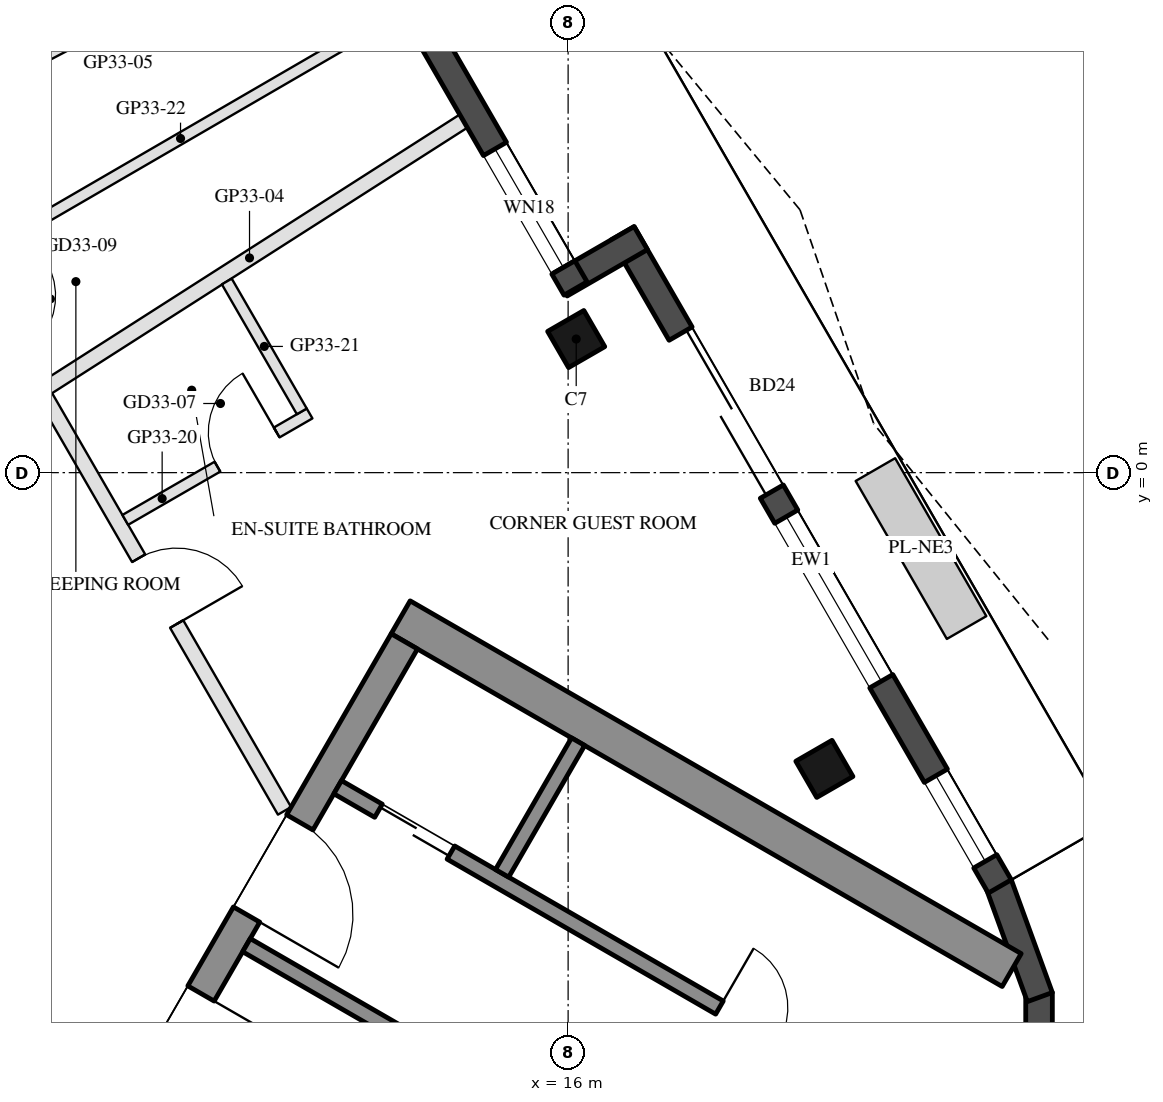
"""IFC4 building model, lengths in metres.
Left out: names, types, materials, properties, quantities, classifications, styles, units other than length and angle.
Written with IfcOpenShell. Run it as: python <this file> out.ifc"""

import sys

from ifc_helpers import new_model, si_unit, direction, frame, frame_2d, origin, origin_2d, place, context, subcontext, project, spatial, rectangle, hollow_rectangle, extrude, boolean, halfspace, element, fill, save


model = new_model("IFC4")
c1 = context("Model", 3, precision=1e-05, world=origin(), true_north=direction((0.0, 1.0)))
c2 = subcontext(c1, "Body", "Model", "MODEL_VIEW")
j1 = project(units=[si_unit("LENGTHUNIT", "METRE"), si_unit("PLANEANGLEUNIT", "RADIAN")], contexts=[c1])
p1 = place(None, origin())
s1 = spatial("IfcSite", under=j1, at=p1, CompositionType="ELEMENT")
p2 = place(p1, origin())
s2 = spatial("IfcBuilding", under=s1, at=p2, CompositionType="ELEMENT")
p3 = place(p2, frame((0.0, 0.0, 317.0)))
s3 = spatial("IfcBuildingStorey", under=s2, at=p3, CompositionType="ELEMENT", Elevation=317.0)
p4 = place(p3, frame((19.372, -3.898, 0.0), z_axis=(0.0, 0.0, 1.0), x_axis=(-0.5, 0.866025403784, 0.0)))
e1 = element("IfcColumn", 1, at=p4, inside=s3, PredefinedType="COLUMN", context=c2, shape_type="SweptSolid", body=[
    boolean("DIFFERENCE", extrude(hollow_rectangle(XDim=0.55, YDim=0.55, WallThickness=0.025, at=origin_2d()), origin(), (0.0, 0.0, 1.0), 3.7), halfspace(frame((0.0, 0.0, 3.66), z_axis=(0.0, 0.0, 1.0), x_axis=(1.0, 0.0, 0.0)), False)),
])
p5 = place(p3, frame((16.106, 1.758, 0.0), z_axis=(0.0, 0.0, 1.0), x_axis=(-0.5, 0.866025403784, 0.0)))
e2 = element("IfcColumn", 2, at=p5, inside=s3, PredefinedType="COLUMN", context=c2, shape_type="SweptSolid", body=[
    boolean("DIFFERENCE", extrude(hollow_rectangle(XDim=0.55, YDim=0.55, WallThickness=0.025, at=origin_2d()), origin(), (0.0, 0.0, 1.0), 3.7), halfspace(frame((0.0, 0.0, 3.666), z_axis=(0.0, 0.0, 1.0), x_axis=(1.0, 0.0, 0.0)), False)),
])
for number, where, z_axis, x_axis in (
    (3, (22.196, -8.42, 0.0), (0.0, 0.0, 1.0), (0.0, 1.0, 0.0)),
    (4, (22.206, -6.9, 0.0), (0.0, 0.0, 1.0), (-0.342, 0.94, 0.0)),
):
    element("IfcWall", number, at=place(p3, frame(where, z_axis=z_axis, x_axis=x_axis)), inside=s3, PredefinedType="SOLIDWALL", context=c2, shape_type="SweptSolid", body=[
        extrude(rectangle(XDim=1.579, YDim=0.35, at=frame_2d((0.79, 0.0))), origin(), (0.0, 0.0, 1.0), 3.55),
    ])
p6 = place(p3, frame((21.679, -5.444, 0.0), z_axis=(0.0, 0.0, 1.0), x_axis=(-0.500020587865, 0.866013517049, 0.0)))
e5 = element("IfcWall", 5, at=p6, inside=s3, PredefinedType="SOLIDWALL", context=c2, shape_type="SweptSolid", body=[
    extrude(rectangle(XDim=9.924, YDim=0.35, at=frame_2d((4.962, 0.0))), origin(), (0.0, 0.0, 1.0), 3.55),
])
p7 = place(p6, frame((0.381, 0.0, 0.3)))
e6 = element("IfcOpeningElement", 6, at=p7, cuts=e5, PredefinedType="OPENING", context=c2, shape_type="SweptSolid", body=[
    extrude(rectangle(XDim=1.3, YDim=2.65, at=frame_2d((0.65, 1.325))), frame((0.0, 0.185, 0.0), z_axis=(0.0, -1.0, 0.0), x_axis=(1.0, 0.0, 0.0)), (0.0, 0.0, 1.0), 0.37),
])
p8 = place(p6, frame((5.999, 0.0, 0.0)))
e7 = element("IfcOpeningElement", 7, at=p8, cuts=e5, PredefinedType="OPENING", context=c2, shape_type="SweptSolid", body=[
    extrude(rectangle(XDim=2.4, YDim=2.4, at=frame_2d((1.2, 1.2))), frame((0.0, 0.185, 0.0), z_axis=(0.0, -1.0, 0.0), x_axis=(1.0, 0.0, 0.0)), (0.0, 0.0, 1.0), 0.37),
])
p9 = place(p6, frame((3.118, 0.0, 0.3)))
e8 = element("IfcOpeningElement", 8, at=p9, cuts=e5, PredefinedType="OPENING", context=c2, shape_type="SweptSolid", body=[
    extrude(rectangle(XDim=2.5, YDim=2.65, at=frame_2d((1.25, 1.325))), frame((0.0, 0.185, 0.0), z_axis=(0.0, -1.0, 0.0), x_axis=(1.0, 0.0, 0.0)), (0.0, 0.0, 1.0), 0.37),
])
p10 = place(p3, frame((16.956, 3.086, 0.0), z_axis=(0.0, 0.0, 1.0), x_axis=(-0.866005645448, -0.500034220881, 0.0)))
e9 = element("IfcWall", 9, at=p10, inside=s3, PredefinedType="SOLIDWALL", context=c2, shape_type="SweptSolid", body=[
    extrude(rectangle(XDim=1.22, YDim=0.35, at=frame_2d((0.61, 0.0))), origin(), (0.0, 0.0, 1.0), 3.55),
])
p11 = place(p3, frame((16.098, 2.423, 0.0), z_axis=(0.0, 0.0, 1.0), x_axis=(-0.499996591357, 0.866027371756, 0.0)))
e10 = element("IfcWall", 10, at=p11, inside=s3, PredefinedType="SOLIDWALL", context=c2, shape_type="SweptSolid", body=[
    extrude(rectangle(XDim=5.371, YDim=0.35, at=frame_2d((2.685, 0.0))), origin(), (0.0, 0.0, 1.0), 3.55),
])
p12 = place(p11, frame((0.32, 0.0, 0.3)))
e11 = element("IfcOpeningElement", 11, at=p12, cuts=e10, PredefinedType="OPENING", context=c2, shape_type="SweptSolid", body=[
    extrude(rectangle(XDim=1.8, YDim=2.65, at=frame_2d((0.9, 1.325))), frame((0.0, 0.185, 0.0), z_axis=(0.0, -1.0, 0.0), x_axis=(1.0, 0.0, 0.0)), (0.0, 0.0, 1.0), 0.37),
])
p13 = place(p3, frame((13.797, -1.903, 0.0), z_axis=(0.0, 0.0, 1.0), x_axis=(0.866025286072, -0.500000203884, 0.0)))
e12 = element("IfcWall", 12, at=p13, inside=s3, PredefinedType="SHEAR", context=c2, shape_type="SweptSolid", body=[
    extrude(rectangle(XDim=9.283, YDim=0.5, at=frame_2d((4.641, 0.0))), origin(), (0.0, 0.0, 1.0), 3.5),
])
p14 = place(p3, frame((8.845, -10.88, 0.0), z_axis=(0.0, 0.0, 1.0), x_axis=(0.500004234368, 0.866022959057, 0.0)))
e13 = element("IfcWall", 13, at=p14, inside=s3, PredefinedType="SHEAR", context=c2, shape_type="SweptSolid", body=[
    extrude(rectangle(XDim=10.0, YDim=0.4, at=frame_2d((5.0, 0.0))), origin(), (0.0, 0.0, 1.0), 3.5),
])
p15 = place(p14, frame((3.55, 0.0, 0.0)))
e14 = element("IfcOpeningElement", 14, at=p15, cuts=e13, PredefinedType="OPENING", context=c2, shape_type="SweptSolid", body=[
    extrude(rectangle(XDim=1.1, YDim=2.1, at=frame_2d((0.55, 1.05))), frame((0.0, 0.21, 0.0), z_axis=(0.0, -1.0, 0.0), x_axis=(1.0, 0.0, 0.0)), (0.0, 0.0, 1.0), 0.42),
])
p16 = place(p14, frame((5.85, 0.0, 0.0)))
e15 = element("IfcOpeningElement", 15, at=p16, cuts=e13, PredefinedType="OPENING", context=c2, shape_type="SweptSolid", body=[
    extrude(rectangle(XDim=1.4, YDim=2.1, at=frame_2d((0.7, 1.05))), frame((0.0, 0.21, 0.0), z_axis=(0.0, -1.0, 0.0), x_axis=(1.0, 0.0, 0.0)), (0.0, 0.0, 1.0), 0.42),
])
p17 = place(p3, frame((11.768, -6.217, 0.0), z_axis=(0.0, 0.0, 1.0), x_axis=(0.866050077142, -0.499957262057, 0.0)))
e16 = element("IfcWall", 16, at=p17, inside=s3, PredefinedType="SHEAR", context=c2, shape_type="SweptSolid", body=[
    extrude(rectangle(XDim=2.4, YDim=0.2, at=frame_2d((1.2, 0.0))), origin(), (0.0, 0.0, 1.0), 3.5),
])
p18 = place(p3, frame((12.968, -4.138, 0.0), z_axis=(0.0, 0.0, 1.0), x_axis=(0.866025710499, -0.499999468754, 0.0)))
e17 = element("IfcWall", 17, at=p18, inside=s3, PredefinedType="SHEAR", context=c2, shape_type="SweptSolid", body=[
    extrude(rectangle(XDim=10.121, YDim=0.2, at=frame_2d((5.061, 0.0))), origin(), (0.0, 0.0, 1.0), 3.5),
])
p19 = place(p18, frame((0.62, 0.0, 0.0)))
e18 = element("IfcOpeningElement", 18, at=p19, cuts=e17, PredefinedType="OPENING", context=c2, shape_type="SweptSolid", body=[
    extrude(rectangle(XDim=1.1, YDim=2.1, at=frame_2d((0.55, 1.05))), frame((0.0, 0.11, 0.0), z_axis=(0.0, -1.0, 0.0), x_axis=(1.0, 0.0, 0.0)), (0.0, 0.0, 1.0), 0.22),
])
p20 = place(p18, frame((5.8, 0.0, 0.0)))
e19 = element("IfcOpeningElement", 19, at=p20, cuts=e17, PredefinedType="OPENING", context=c2, shape_type="SweptSolid", body=[
    extrude(rectangle(XDim=0.9, YDim=2.1, at=frame_2d((0.45, 1.05))), frame((0.0, 0.11, 0.0), z_axis=(0.0, -1.0, 0.0), x_axis=(1.0, 0.0, 0.0)), (0.0, 0.0, 1.0), 0.22),
])
p21 = place(p3, frame((15.131, -5.272, 0.0), z_axis=(0.0, 0.0, 1.0), x_axis=(0.499972520799, 0.866041268327, 0.0)))
e20 = element("IfcWall", 20, at=p21, inside=s3, PredefinedType="SHEAR", context=c2, shape_type="SweptSolid", body=[
    extrude(rectangle(XDim=2.0, YDim=0.2, at=frame_2d((1.0, 0.0))), origin(), (0.0, 0.0, 1.0), 3.5),
])
p22 = place(p3, frame((14.624, 4.625, 0.0), z_axis=(0.0, 0.0, 1.0), x_axis=(-0.842484919653, -0.53871992738, 0.0)))
e21 = element("IfcWall", 21, at=p22, inside=s3, PredefinedType="PARTITIONING", context=c2, shape_type="SweptSolid", body=[
    extrude(rectangle(XDim=6.685, YDim=0.2, at=frame_2d((3.342, 0.0))), origin(), (0.0, 0.0, 1.0), 3.1),
])
p23 = place(p3, frame((12.576, 7.323, 0.0), z_axis=(0.0, 0.0, 1.0), x_axis=(-0.885630617544, -0.464390363023, 0.0)))
e22 = element("IfcWall", 22, at=p23, inside=s3, PredefinedType="PARTITIONING", context=c2, shape_type="SweptSolid", body=[
    extrude(rectangle(XDim=6.258, YDim=0.2, at=frame_2d((3.129, 0.0))), origin(), (0.0, 0.0, 1.0), 3.1),
])
p24 = place(p3, frame((9.127, 0.992, 0.0), z_axis=(0.0, 0.0, 1.0), x_axis=(0.500012817413, -0.866018003521, 0.0)))
e23 = element("IfcWall", 23, at=p24, inside=s3, PredefinedType="PARTITIONING", context=c2, shape_type="SweptSolid", body=[
    extrude(rectangle(XDim=6.283, YDim=0.2, at=frame_2d((3.142, 0.0))), origin(), (0.0, 0.0, 1.0), 3.1),
])
p25 = place(p24, frame((2.446, 0.0, 0.0)))
e24 = element("IfcOpeningElement", 24, at=p25, cuts=e23, PredefinedType="OPENING", context=c2, shape_type="SweptSolid", body=[
    extrude(rectangle(XDim=1.0, YDim=2.1, at=frame_2d((0.5, 1.05))), frame((0.0, 0.11, 0.0), z_axis=(0.0, -1.0, 0.0), x_axis=(1.0, 0.0, 0.0)), (0.0, 0.0, 1.0), 0.22),
])
p26 = place(p3, frame((10.174, -0.622, 0.0), z_axis=(0.0, 0.0, 1.0), x_axis=(0.865996816683, 0.500049511043, 0.0)))
e25 = element("IfcWall", 25, at=p26, inside=s3, PredefinedType="PARTITIONING", context=c2, shape_type="SweptSolid", body=[
    extrude(rectangle(XDim=2.8, YDim=0.15, at=frame_2d((1.4, 0.0))), origin(), (0.0, 0.0, 1.0), 3.55),
])
p27 = place(p26, frame((1.4, 0.0, 0.0)))
e26 = element("IfcOpeningElement", 26, at=p27, cuts=e25, PredefinedType="OPENING", context=c2, shape_type="SweptSolid", body=[
    extrude(rectangle(XDim=0.9, YDim=2.1, at=frame_2d((0.45, 1.05))), frame((0.0, 0.085, 0.0), z_axis=(0.0, -1.0, 0.0), x_axis=(1.0, 0.0, 0.0)), (0.0, 0.0, 1.0), 0.17),
])
p28 = place(p3, frame((12.496, 0.806, 0.0), z_axis=(0.0, 0.0, 1.0), x_axis=(-0.499904503454, 0.866080531721, 0.0)))
e27 = element("IfcWall", 27, at=p28, inside=s3, PredefinedType="PARTITIONING", context=c2, shape_type="SweptSolid", body=[
    extrude(rectangle(XDim=1.974, YDim=0.15, at=frame_2d((0.987, 0.0))), origin(), (0.0, 0.0, 1.0), 3.55),
])
p29 = place(p3, frame((13.788, 6.073, 0.0), z_axis=(0.0, 0.0, 1.0), x_axis=(-0.864855005342, -0.502021732334, 0.0)))
e28 = element("IfcWall", 28, at=p29, inside=s3, PredefinedType="PARTITIONING", context=c2, shape_type="SweptSolid", body=[
    extrude(rectangle(XDim=6.677, YDim=0.15, at=frame_2d((3.339, 0.0))), origin(), (0.0, 0.0, 1.0), 3.1),
])
p30 = place(p7, origin())
e29 = element("IfcWindow", 29, at=p30, inside=s3, PartitioningType="SINGLE_PANEL", PredefinedType="WINDOW", context=c2, shape_type="SweptSolid", body=[
    extrude(rectangle(XDim=1.3, YDim=2.65, at=frame_2d((0.65, 1.325))), frame((0.0, 0.03, 0.0), z_axis=(0.0, -1.0, 0.0), x_axis=(1.0, 0.0, 0.0)), (0.0, 0.0, 1.0), 0.06),
])
fill(e6, e29)
p31 = place(p8, frame((2.4, 0.0, 0.0), z_axis=(0.0, 0.0, 1.0), x_axis=(-1.0, 0.0, 0.0)))
e30 = element("IfcDoor", 30, at=p31, inside=s3, OperationType="SLIDING_TO_LEFT", PredefinedType="DOOR", context=c2, shape_type="SweptSolid", body=[
    extrude(rectangle(XDim=2.4, YDim=2.4, at=frame_2d((1.2, 1.2))), frame((0.0, 0.025, 0.0), z_axis=(0.0, -1.0, 0.0), x_axis=(1.0, 0.0, 0.0)), (0.0, 0.0, 1.0), 0.05),
])
fill(e7, e30)
p32 = place(p9, origin())
e31 = element("IfcWindow", 31, at=p32, inside=s3, PartitioningType="SINGLE_PANEL", PredefinedType="WINDOW", context=c2, shape_type="SweptSolid", body=[
    extrude(rectangle(XDim=2.5, YDim=2.65, at=frame_2d((1.25, 1.325))), frame((0.0, 0.03, 0.0), z_axis=(0.0, -1.0, 0.0), x_axis=(1.0, 0.0, 0.0)), (0.0, 0.0, 1.0), 0.06),
])
fill(e8, e31)
p33 = place(p12, origin())
e32 = element("IfcWindow", 32, at=p33, inside=s3, PartitioningType="SINGLE_PANEL", PredefinedType="WINDOW", context=c2, shape_type="SweptSolid", body=[
    extrude(rectangle(XDim=1.8, YDim=2.65, at=frame_2d((0.9, 1.325))), frame((0.0, 0.03, 0.0), z_axis=(0.0, -1.0, 0.0), x_axis=(1.0, 0.0, 0.0)), (0.0, 0.0, 1.0), 0.06),
])
fill(e11, e32)
p34 = place(p19, origin())
e33 = element("IfcDoor", 33, at=p34, inside=s3, OperationType="DOUBLE_DOOR_SLIDING", PredefinedType="DOOR", context=c2, shape_type="SweptSolid", body=[
    extrude(rectangle(XDim=1.1, YDim=2.1, at=frame_2d((0.55, 1.05))), frame((0.0, 0.025, 0.0), z_axis=(0.0, -1.0, 0.0), x_axis=(1.0, 0.0, 0.0)), (0.0, 0.0, 1.0), 0.05),
])
fill(e18, e33)
p35 = place(p20, origin())
e34 = element("IfcDoor", 34, at=p35, inside=s3, OperationType="SINGLE_SWING_LEFT", PredefinedType="DOOR", context=c2, shape_type="SweptSolid", body=[
    extrude(rectangle(XDim=0.9, YDim=2.1, at=frame_2d((0.45, 1.05))), frame((0.0, 0.025, 0.0), z_axis=(0.0, -1.0, 0.0), x_axis=(1.0, 0.0, 0.0)), (0.0, 0.0, 1.0), 0.05),
])
fill(e19, e34)
p36 = place(p15, frame((1.1, 0.0, 0.0), z_axis=(0.0, 0.0, 1.0), x_axis=(-1.0, 0.0, 0.0)))
e35 = element("IfcDoor", 35, at=p36, inside=s3, OperationType="SINGLE_SWING_LEFT", PredefinedType="DOOR", context=c2, shape_type="SweptSolid", body=[
    extrude(rectangle(XDim=1.1, YDim=2.1, at=frame_2d((0.55, 1.05))), frame((0.0, 0.025, 0.0), z_axis=(0.0, -1.0, 0.0), x_axis=(1.0, 0.0, 0.0)), (0.0, 0.0, 1.0), 0.05),
])
fill(e14, e35)
p37 = place(p16, frame((1.4, 0.0, 0.0), z_axis=(0.0, 0.0, 1.0), x_axis=(-1.0, 0.0, 0.0)))
e36 = element("IfcDoor", 36, at=p37, inside=s3, OperationType="DOUBLE_DOOR_SINGLE_SWING", PredefinedType="DOOR", context=c2, shape_type="SweptSolid", body=[
    extrude(rectangle(XDim=1.4, YDim=2.1, at=frame_2d((0.7, 1.05))), frame((0.0, 0.025, 0.0), z_axis=(0.0, -1.0, 0.0), x_axis=(1.0, 0.0, 0.0)), (0.0, 0.0, 1.0), 0.05),
])
fill(e15, e36)
p38 = place(p27, origin())
e37 = element("IfcDoor", 37, at=p38, inside=s3, OperationType="SINGLE_SWING_RIGHT", PredefinedType="DOOR", context=c2, shape_type="SweptSolid", body=[
    extrude(rectangle(XDim=0.9, YDim=2.1, at=frame_2d((0.45, 1.05))), frame((0.0, 0.025, 0.0), z_axis=(0.0, -1.0, 0.0), x_axis=(1.0, 0.0, 0.0)), (0.0, 0.0, 1.0), 0.05),
])
fill(e26, e37)
p39 = place(p25, origin())
e38 = element("IfcDoor", 38, at=p39, inside=s3, OperationType="SINGLE_SWING_RIGHT", PredefinedType="DOOR", context=c2, shape_type="SweptSolid", body=[
    extrude(rectangle(XDim=1.0, YDim=2.1, at=frame_2d((0.5, 1.05))), frame((0.0, 0.025, 0.0), z_axis=(0.0, -1.0, 0.0), x_axis=(1.0, 0.0, 0.0)), (0.0, 0.0, 1.0), 0.05),
])
fill(e24, e38)
save(model, sys.argv[1])
